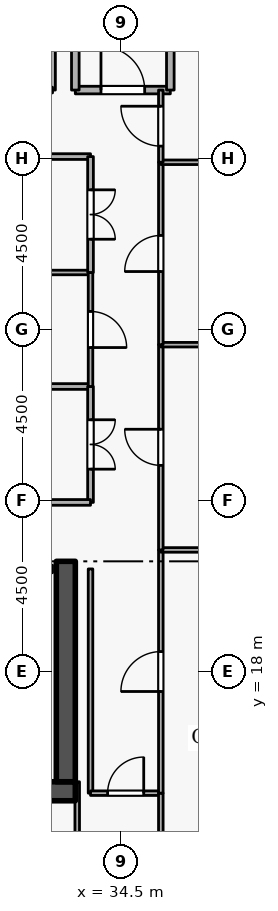
"""IFC4 building model, lengths in metres.
Left out: names, types, materials, properties, quantities, classifications, styles, units other than length and angle.
Written with IfcOpenShell. Run it as: python <this file> out.ifc"""

import sys

from ifc_helpers import new_model, si_unit, direction, frame, frame_2d, origin, place, context, subcontext, project, spatial, rectangle, extrude, element, fill, save


model = new_model("IFC4")
c1 = context("Model", 3, precision=1e-05, world=origin(), true_north=direction((0.0, 1.0)))
c2 = subcontext(c1, "Body", "Model", "MODEL_VIEW")
j1 = project(units=[si_unit("LENGTHUNIT", "METRE"), si_unit("PLANEANGLEUNIT", "RADIAN")], contexts=[c1])
p1 = place(None, origin())
s1 = spatial("IfcSite", under=j1, at=p1, CompositionType="ELEMENT")
p2 = place(p1, origin())
s2 = spatial("IfcBuilding", under=s1, at=p2, CompositionType="ELEMENT")
p3 = place(p2, frame((0.0, 0.0, 247.5)))
s3 = spatial("IfcBuildingStorey", under=s2, at=p3, CompositionType="ELEMENT", Elevation=247.5)
p4 = place(p3, frame((17.7, 14.85, 0.0), z_axis=(0.0, 0.0, 1.0), x_axis=(1.0, 0.0, 0.0)))
e1 = element("IfcWall", 1, at=p4, inside=s3, PredefinedType="SHEAR", context=c2, shape_type="SweptSolid", body=[
    extrude(rectangle(XDim=15.6, YDim=0.5, at=frame_2d((7.8, 0.0))), origin(), (0.0, 0.0, 1.0), 3.6),
])
p5 = place(p3, frame((33.05, 15.1, 0.0), z_axis=(0.0, 0.0, 1.0), x_axis=(0.0, 1.0, 0.0)))
e2 = element("IfcWall", 2, at=p5, inside=s3, PredefinedType="SHEAR", context=c2, shape_type="SweptSolid", body=[
    extrude(rectangle(XDim=5.8, YDim=0.5, at=frame_2d((2.9, 0.0))), origin(), (0.0, 0.0, 1.0), 3.6),
])
p6 = place(p3, frame((33.3, 33.3, 0.0), z_axis=(0.0, 0.0, 1.0), x_axis=(1.0, 0.0, 0.0)))
e3 = element("IfcWall", 3, at=p6, inside=s3, PredefinedType="STANDARD", context=c2, shape_type="SweptSolid", body=[
    extrude(rectangle(XDim=2.5, YDim=0.2, at=frame_2d((1.25, 0.0))), origin(), (0.0, 0.0, 1.0), 3.34),
])
p7 = place(p6, frame((0.675, 0.0, 0.0)))
e4 = element("IfcOpeningElement", 4, at=p7, cuts=e3, PredefinedType="OPENING", context=c2, shape_type="SweptSolid", body=[
    extrude(rectangle(XDim=1.15, YDim=2.1, at=frame_2d((0.575, 1.05))), frame((0.0, 0.11, 0.0), z_axis=(0.0, -1.0, 0.0), x_axis=(1.0, 0.0, 0.0)), (0.0, 0.0, 1.0), 0.22),
])
p8 = place(p3, frame((35.8, 33.3, 0.0), z_axis=(0.0, 0.0, 1.0), x_axis=(0.0, 1.0, 0.0)))
e5 = element("IfcWall", 5, at=p8, inside=s3, PredefinedType="STANDARD", context=c2, shape_type="SweptSolid", body=[
    extrude(rectangle(XDim=5.7, YDim=0.2, at=frame_2d((2.85, 0.0))), origin(), (0.0, 0.0, 1.0), 3.34),
])
p9 = place(p3, frame((33.3, 35.6, 0.0), z_axis=(0.0, 0.0, 1.0), x_axis=(0.0, -1.0, 0.0)))
e6 = element("IfcWall", 6, at=p9, inside=s3, PredefinedType="STANDARD", context=c2, shape_type="SweptSolid", body=[
    extrude(rectangle(XDim=2.3, YDim=0.2, at=frame_2d((1.15, 0.0))), origin(), (0.0, 0.0, 1.0), 2.545),
])
p10 = place(p3, frame((30.5, 20.7, 0.0), z_axis=(0.0, 0.0, 1.0), x_axis=(1.0, 0.0, 0.0)))
e7 = element("IfcWall", 7, at=p10, inside=s3, PredefinedType="STANDARD", context=c2, shape_type="SweptSolid", body=[
    extrude(rectangle(XDim=2.2, YDim=0.2, at=frame_2d((1.1, 0.0))), origin(), (0.0, 0.0, 1.0), 3.34),
])
p11 = place(p10, frame((0.525, 0.0, 0.0)))
e8 = element("IfcOpeningElement", 8, at=p11, cuts=e7, PredefinedType="OPENING", context=c2, shape_type="SweptSolid", body=[
    extrude(rectangle(XDim=1.15, YDim=2.1, at=frame_2d((0.575, 1.05))), frame((0.0, 0.11, 0.0), z_axis=(0.0, -1.0, 0.0), x_axis=(1.0, 0.0, 0.0)), (0.0, 0.0, 1.0), 0.22),
])
p12 = place(p3, frame((32.7, 35.35, 0.0), z_axis=(0.0, 0.0, 1.0), x_axis=(0.0, -1.0, 0.0)))
e9 = element("IfcWall", 9, at=p12, inside=s3, PredefinedType="PARTITIONING", context=c2, shape_type="SweptSolid", body=[
    extrude(rectangle(XDim=2.05, YDim=0.15, at=frame_2d((1.025, 0.0))), origin(), (0.0, 0.0, 1.0), 2.545),
])
p13 = place(p3, frame((32.7, 33.3, 0.0), z_axis=(0.0, 0.0, 1.0), x_axis=(-1.0, 0.0, 0.0)))
e10 = element("IfcWall", 10, at=p13, inside=s3, PredefinedType="PARTITIONING", context=c2, shape_type="SweptSolid", body=[
    extrude(rectangle(XDim=2.35, YDim=0.15, at=frame_2d((1.175, 0.0))), origin(), (0.0, 0.0, 1.0), 3.34),
])
p14 = place(p13, frame((0.715, 0.0, 0.0)))
e11 = element("IfcOpeningElement", 11, at=p14, cuts=e10, PredefinedType="OPENING", context=c2, shape_type="SweptSolid", body=[
    extrude(rectangle(XDim=0.92, YDim=2.08, at=frame_2d((0.46, 1.04))), frame((0.0, 0.085, 0.0), z_axis=(0.0, -1.0, 0.0), x_axis=(1.0, 0.0, 0.0)), (0.0, 0.0, 1.0), 0.17),
])
p15 = place(p3, frame((33.7, 20.7, 0.0), z_axis=(0.0, 0.0, 1.0), x_axis=(0.0, -1.0, 0.0)))
e12 = element("IfcWall", 12, at=p15, inside=s3, PredefinedType="PARTITIONING", context=c2, shape_type="SweptSolid", body=[
    extrude(rectangle(XDim=5.9, YDim=0.12, at=frame_2d((2.95, 0.0))), origin(), (0.0, 0.0, 1.0), 3.34),
])
p16 = place(p3, frame((33.7, 14.8, 0.0), z_axis=(0.0, 0.0, 1.0), x_axis=(1.0, 0.0, 0.0)))
e13 = element("IfcWall", 13, at=p16, inside=s3, PredefinedType="PARTITIONING", context=c2, shape_type="SweptSolid", body=[
    extrude(rectangle(XDim=1.85, YDim=0.12, at=frame_2d((0.925, 0.0))), origin(), (0.0, 0.0, 1.0), 3.34),
])
p17 = place(p16, frame((0.45, 0.0, 0.0)))
e14 = element("IfcOpeningElement", 14, at=p17, cuts=e13, PredefinedType="OPENING", context=c2, shape_type="SweptSolid", body=[
    extrude(rectangle(XDim=0.95, YDim=2.1, at=frame_2d((0.475, 1.05))), frame((0.0, 0.07, 0.0), z_axis=(0.0, -1.0, 0.0), x_axis=(1.0, 0.0, 0.0)), (0.0, 0.0, 1.0), 0.14),
])
p18 = place(p3, frame((35.55, 14.8, 0.0), z_axis=(0.0, 0.0, 1.0), x_axis=(0.0, -1.0, 0.0)))
e15 = element("IfcWall", 15, at=p18, inside=s3, PredefinedType="PARTITIONING", context=c2, shape_type="SweptSolid", body=[
    extrude(rectangle(XDim=11.52, YDim=0.12, at=frame_2d((5.76, 0.0))), origin(), (0.0, 0.0, 1.0), 3.34),
])
p19 = place(p3, frame((33.35, 3.28, 0.0), z_axis=(0.0, 0.0, 1.0), x_axis=(0.0, 1.0, 0.0)))
e16 = element("IfcWall", 16, at=p19, inside=s3, PredefinedType="PARTITIONING", context=c2, shape_type="SweptSolid", body=[
    extrude(rectangle(XDim=11.82, YDim=0.12, at=frame_2d((5.91, 0.0))), origin(), (0.0, 0.0, 1.0), 2.545),
])
p20 = place(p3, frame((35.55, 14.8, 0.0), z_axis=(0.0, 0.0, 1.0), x_axis=(0.0, 1.0, 0.0)))
e17 = element("IfcWall", 17, at=p20, inside=s3, PredefinedType="PARTITIONING", context=c2, shape_type="SweptSolid", body=[
    extrude(rectangle(XDim=6.4, YDim=0.12, at=frame_2d((3.2, 0.0))), origin(), (0.0, 0.0, 1.0), 3.34),
])
p21 = place(p20, frame((2.675, 0.0, 0.0)))
e18 = element("IfcOpeningElement", 18, at=p21, cuts=e17, PredefinedType="OPENING", context=c2, shape_type="SweptSolid", body=[
    extrude(rectangle(XDim=1.05, YDim=2.1, at=frame_2d((0.525, 1.05))), frame((0.0, 0.07, 0.0), z_axis=(0.0, -1.0, 0.0), x_axis=(1.0, 0.0, 0.0)), (0.0, 0.0, 1.0), 0.14),
])
p22 = place(p3, frame((35.55, 21.2, 0.0), z_axis=(0.0, 0.0, 1.0), x_axis=(1.0, 0.0, 0.0)))
e19 = element("IfcWall", 19, at=p22, inside=s3, PredefinedType="PARTITIONING", context=c2, shape_type="SweptSolid", body=[
    extrude(rectangle(XDim=7.67, YDim=0.12, at=frame_2d((3.835, 0.0))), origin(), (0.0, 0.0, 1.0), 3.34),
])
p23 = place(p3, frame((35.55, 21.2, 0.0), z_axis=(0.0, 0.0, 1.0), x_axis=(0.0, 1.0, 0.0)))
e20 = element("IfcWall", 20, at=p23, inside=s3, PredefinedType="PARTITIONING", context=c2, shape_type="SweptSolid", body=[
    extrude(rectangle(XDim=5.4, YDim=0.12, at=frame_2d((2.7, 0.0))), origin(), (0.0, 0.0, 1.0), 3.34),
])
p24 = place(p23, frame((2.225, 0.0, 0.0)))
e21 = element("IfcOpeningElement", 21, at=p24, cuts=e20, PredefinedType="OPENING", context=c2, shape_type="SweptSolid", body=[
    extrude(rectangle(XDim=0.95, YDim=2.1, at=frame_2d((0.475, 1.05))), frame((0.0, 0.07, 0.0), z_axis=(0.0, -1.0, 0.0), x_axis=(1.0, 0.0, 0.0)), (0.0, 0.0, 1.0), 0.14),
])
p25 = place(p3, frame((35.55, 26.6, 0.0), z_axis=(0.0, 0.0, 1.0), x_axis=(1.0, 0.0, 0.0)))
e22 = element("IfcWall", 22, at=p25, inside=s3, PredefinedType="PARTITIONING", context=c2, shape_type="SweptSolid", body=[
    extrude(rectangle(XDim=7.25, YDim=0.12, at=frame_2d((3.625, 0.0))), origin(), (0.0, 0.0, 1.0), 3.34),
])
p26 = place(p3, frame((35.55, 26.6, 0.0), z_axis=(0.0, 0.0, 1.0), x_axis=(0.0, 1.0, 0.0)))
e23 = element("IfcWall", 23, at=p26, inside=s3, PredefinedType="PARTITIONING", context=c2, shape_type="SweptSolid", body=[
    extrude(rectangle(XDim=4.8, YDim=0.12, at=frame_2d((2.4, 0.0))), origin(), (0.0, 0.0, 1.0), 3.34),
])
p27 = place(p26, frame((1.925, 0.0, 0.0)))
e24 = element("IfcOpeningElement", 24, at=p27, cuts=e23, PredefinedType="OPENING", context=c2, shape_type="SweptSolid", body=[
    extrude(rectangle(XDim=0.95, YDim=2.1, at=frame_2d((0.475, 1.05))), frame((0.0, 0.07, 0.0), z_axis=(0.0, -1.0, 0.0), x_axis=(1.0, 0.0, 0.0)), (0.0, 0.0, 1.0), 0.14),
])
p28 = place(p3, frame((35.55, 31.4, 0.0), z_axis=(0.0, 0.0, 1.0), x_axis=(1.0, 0.0, 0.0)))
e25 = element("IfcWall", 25, at=p28, inside=s3, PredefinedType="PARTITIONING", context=c2, shape_type="SweptSolid", body=[
    extrude(rectangle(XDim=7.67, YDim=0.12, at=frame_2d((3.835, 0.0))), origin(), (0.0, 0.0, 1.0), 3.34),
])
p29 = place(p3, frame((35.55, 31.4, 0.0), z_axis=(0.0, 0.0, 1.0), x_axis=(0.0, 1.0, 0.0)))
e26 = element("IfcWall", 26, at=p29, inside=s3, PredefinedType="PARTITIONING", context=c2, shape_type="SweptSolid", body=[
    extrude(rectangle(XDim=1.9, YDim=0.12, at=frame_2d((0.95, 0.0))), origin(), (0.0, 0.0, 1.0), 3.34),
])
p30 = place(p29, frame((0.425, 0.0, 0.0)))
e27 = element("IfcOpeningElement", 27, at=p30, cuts=e26, PredefinedType="OPENING", context=c2, shape_type="SweptSolid", body=[
    extrude(rectangle(XDim=1.05, YDim=2.1, at=frame_2d((0.525, 1.05))), frame((0.0, 0.07, 0.0), z_axis=(0.0, -1.0, 0.0), x_axis=(1.0, 0.0, 0.0)), (0.0, 0.0, 1.0), 0.14),
])
p31 = place(p3, frame((30.7, 25.5, 0.0), z_axis=(0.0, 0.0, 1.0), x_axis=(1.0, 0.0, 0.0)))
e28 = element("IfcWall", 28, at=p31, inside=s3, PredefinedType="PARTITIONING", context=c2, shape_type="SweptSolid", body=[
    extrude(rectangle(XDim=3.0, YDim=0.15, at=frame_2d((1.5, 0.0))), origin(), (0.0, 0.0, 1.0), 3.34),
])
p32 = place(p3, frame((33.7, 25.5, 0.0), z_axis=(0.0, 0.0, 1.0), x_axis=(0.0, -1.0, 0.0)))
e29 = element("IfcWall", 29, at=p32, inside=s3, PredefinedType="PARTITIONING", context=c2, shape_type="SweptSolid", body=[
    extrude(rectangle(XDim=3.05, YDim=0.15, at=frame_2d((1.525, 0.0))), origin(), (0.0, 0.0, 1.0), 3.34),
])
p33 = place(p32, frame((0.875, 0.0, 0.0)))
e30 = element("IfcOpeningElement", 30, at=p33, cuts=e29, PredefinedType="OPENING", context=c2, shape_type="SweptSolid", body=[
    extrude(rectangle(XDim=1.3, YDim=2.12, at=frame_2d((0.65, 1.06))), frame((0.0, 0.085, 0.0), z_axis=(0.0, -1.0, 0.0), x_axis=(1.0, 0.0, 0.0)), (0.0, 0.0, 1.0), 0.17),
])
p34 = place(p3, frame((33.7, 22.45, 0.0), z_axis=(0.0, 0.0, 1.0), x_axis=(-1.0, 0.0, 0.0)))
e31 = element("IfcWall", 31, at=p34, inside=s3, PredefinedType="PARTITIONING", context=c2, shape_type="SweptSolid", body=[
    extrude(rectangle(XDim=3.0, YDim=0.15, at=frame_2d((1.5, 0.0))), origin(), (0.0, 0.0, 1.0), 3.34),
])
p35 = place(p3, frame((30.7, 28.5, 0.0), z_axis=(0.0, 0.0, 1.0), x_axis=(1.0, 0.0, 0.0)))
e32 = element("IfcWall", 32, at=p35, inside=s3, PredefinedType="PARTITIONING", context=c2, shape_type="SweptSolid", body=[
    extrude(rectangle(XDim=3.0, YDim=0.12, at=frame_2d((1.5, 0.0))), origin(), (0.0, 0.0, 1.0), 3.34),
])
p36 = place(p3, frame((33.7, 28.5, 0.0), z_axis=(0.0, 0.0, 1.0), x_axis=(0.0, -1.0, 0.0)))
e33 = element("IfcWall", 33, at=p36, inside=s3, PredefinedType="PARTITIONING", context=c2, shape_type="SweptSolid", body=[
    extrude(rectangle(XDim=3.0, YDim=0.12, at=frame_2d((1.5, 0.0))), origin(), (0.0, 0.0, 1.0), 3.34),
])
p37 = place(p36, frame((1.025, 0.0, 0.0)))
e34 = element("IfcOpeningElement", 34, at=p37, cuts=e33, PredefinedType="OPENING", context=c2, shape_type="SweptSolid", body=[
    extrude(rectangle(XDim=0.95, YDim=2.1, at=frame_2d((0.475, 1.05))), frame((0.0, 0.07, 0.0), z_axis=(0.0, -1.0, 0.0), x_axis=(1.0, 0.0, 0.0)), (0.0, 0.0, 1.0), 0.14),
])
p38 = place(p3, frame((30.7, 31.55, 0.0), z_axis=(0.0, 0.0, 1.0), x_axis=(1.0, 0.0, 0.0)))
e35 = element("IfcWall", 35, at=p38, inside=s3, PredefinedType="PARTITIONING", context=c2, shape_type="SweptSolid", body=[
    extrude(rectangle(XDim=3.0, YDim=0.15, at=frame_2d((1.5, 0.0))), origin(), (0.0, 0.0, 1.0), 3.34),
])
p39 = place(p3, frame((33.7, 31.55, 0.0), z_axis=(0.0, 0.0, 1.0), x_axis=(0.0, -1.0, 0.0)))
e36 = element("IfcWall", 36, at=p39, inside=s3, PredefinedType="PARTITIONING", context=c2, shape_type="SweptSolid", body=[
    extrude(rectangle(XDim=3.05, YDim=0.15, at=frame_2d((1.525, 0.0))), origin(), (0.0, 0.0, 1.0), 3.34),
])
p40 = place(p39, frame((0.875, 0.0, 0.0)))
e37 = element("IfcOpeningElement", 37, at=p40, cuts=e36, PredefinedType="OPENING", context=c2, shape_type="SweptSolid", body=[
    extrude(rectangle(XDim=1.3, YDim=2.12, at=frame_2d((0.65, 1.06))), frame((0.0, 0.085, 0.0), z_axis=(0.0, -1.0, 0.0), x_axis=(1.0, 0.0, 0.0)), (0.0, 0.0, 1.0), 0.17),
])
p41 = place(p7, origin())
e38 = element("IfcDoor", 38, at=p41, inside=s3, OperationType="SINGLE_SWING_LEFT", PredefinedType="DOOR", context=c2, shape_type="SweptSolid", body=[
    extrude(rectangle(XDim=1.15, YDim=2.1, at=frame_2d((0.575, 1.05))), frame((0.0, 0.025, 0.0), z_axis=(0.0, -1.0, 0.0), x_axis=(1.0, 0.0, 0.0)), (0.0, 0.0, 1.0), 0.05),
])
fill(e4, e38)
p42 = place(p17, origin())
e39 = element("IfcDoor", 39, at=p42, inside=s3, OperationType="SINGLE_SWING_RIGHT", PredefinedType="DOOR", context=c2, shape_type="SweptSolid", body=[
    extrude(rectangle(XDim=0.95, YDim=2.1, at=frame_2d((0.475, 1.05))), frame((0.0, 0.025, 0.0), z_axis=(0.0, -1.0, 0.0), x_axis=(1.0, 0.0, 0.0)), (0.0, 0.0, 1.0), 0.05),
])
fill(e14, e39)
p43 = place(p21, origin())
e40 = element("IfcDoor", 40, at=p43, inside=s3, OperationType="SINGLE_SWING_LEFT", PredefinedType="DOOR", context=c2, shape_type="SweptSolid", body=[
    extrude(rectangle(XDim=1.05, YDim=2.1, at=frame_2d((0.525, 1.05))), frame((0.0, 0.025, 0.0), z_axis=(0.0, -1.0, 0.0), x_axis=(1.0, 0.0, 0.0)), (0.0, 0.0, 1.0), 0.05),
])
fill(e18, e40)
p44 = place(p24, origin())
e41 = element("IfcDoor", 41, at=p44, inside=s3, OperationType="SINGLE_SWING_RIGHT", PredefinedType="DOOR", context=c2, shape_type="SweptSolid", body=[
    extrude(rectangle(XDim=0.95, YDim=2.1, at=frame_2d((0.475, 1.05))), frame((0.0, 0.025, 0.0), z_axis=(0.0, -1.0, 0.0), x_axis=(1.0, 0.0, 0.0)), (0.0, 0.0, 1.0), 0.05),
])
fill(e21, e41)
p45 = place(p27, origin())
e42 = element("IfcDoor", 42, at=p45, inside=s3, OperationType="SINGLE_SWING_LEFT", PredefinedType="DOOR", context=c2, shape_type="SweptSolid", body=[
    extrude(rectangle(XDim=0.95, YDim=2.1, at=frame_2d((0.475, 1.05))), frame((0.0, 0.025, 0.0), z_axis=(0.0, -1.0, 0.0), x_axis=(1.0, 0.0, 0.0)), (0.0, 0.0, 1.0), 0.05),
])
fill(e24, e42)
p46 = place(p30, origin())
e43 = element("IfcDoor", 43, at=p46, inside=s3, OperationType="SINGLE_SWING_RIGHT", PredefinedType="DOOR", context=c2, shape_type="SweptSolid", body=[
    extrude(rectangle(XDim=1.05, YDim=2.1, at=frame_2d((0.525, 1.05))), frame((0.0, 0.025, 0.0), z_axis=(0.0, -1.0, 0.0), x_axis=(1.0, 0.0, 0.0)), (0.0, 0.0, 1.0), 0.05),
])
fill(e27, e43)
p47 = place(p33, origin())
e44 = element("IfcDoor", 44, at=p47, inside=s3, OperationType="DOUBLE_DOOR_SINGLE_SWING", PredefinedType="DOOR", context=c2, shape_type="SweptSolid", body=[
    extrude(rectangle(XDim=1.3, YDim=2.12, at=frame_2d((0.65, 1.06))), frame((0.0, 0.025, 0.0), z_axis=(0.0, -1.0, 0.0), x_axis=(1.0, 0.0, 0.0)), (0.0, 0.0, 1.0), 0.05),
])
fill(e30, e44)
p48 = place(p37, origin())
e45 = element("IfcDoor", 45, at=p48, inside=s3, OperationType="SINGLE_SWING_RIGHT", PredefinedType="DOOR", context=c2, shape_type="SweptSolid", body=[
    extrude(rectangle(XDim=0.95, YDim=2.1, at=frame_2d((0.475, 1.05))), frame((0.0, 0.025, 0.0), z_axis=(0.0, -1.0, 0.0), x_axis=(1.0, 0.0, 0.0)), (0.0, 0.0, 1.0), 0.05),
])
fill(e34, e45)
p49 = place(p40, origin())
e46 = element("IfcDoor", 46, at=p49, inside=s3, OperationType="DOUBLE_DOOR_SINGLE_SWING", PredefinedType="DOOR", context=c2, shape_type="SweptSolid", body=[
    extrude(rectangle(XDim=1.3, YDim=2.12, at=frame_2d((0.65, 1.06))), frame((0.0, 0.025, 0.0), z_axis=(0.0, -1.0, 0.0), x_axis=(1.0, 0.0, 0.0)), (0.0, 0.0, 1.0), 0.05),
])
fill(e37, e46)
save(model, sys.argv[1])
